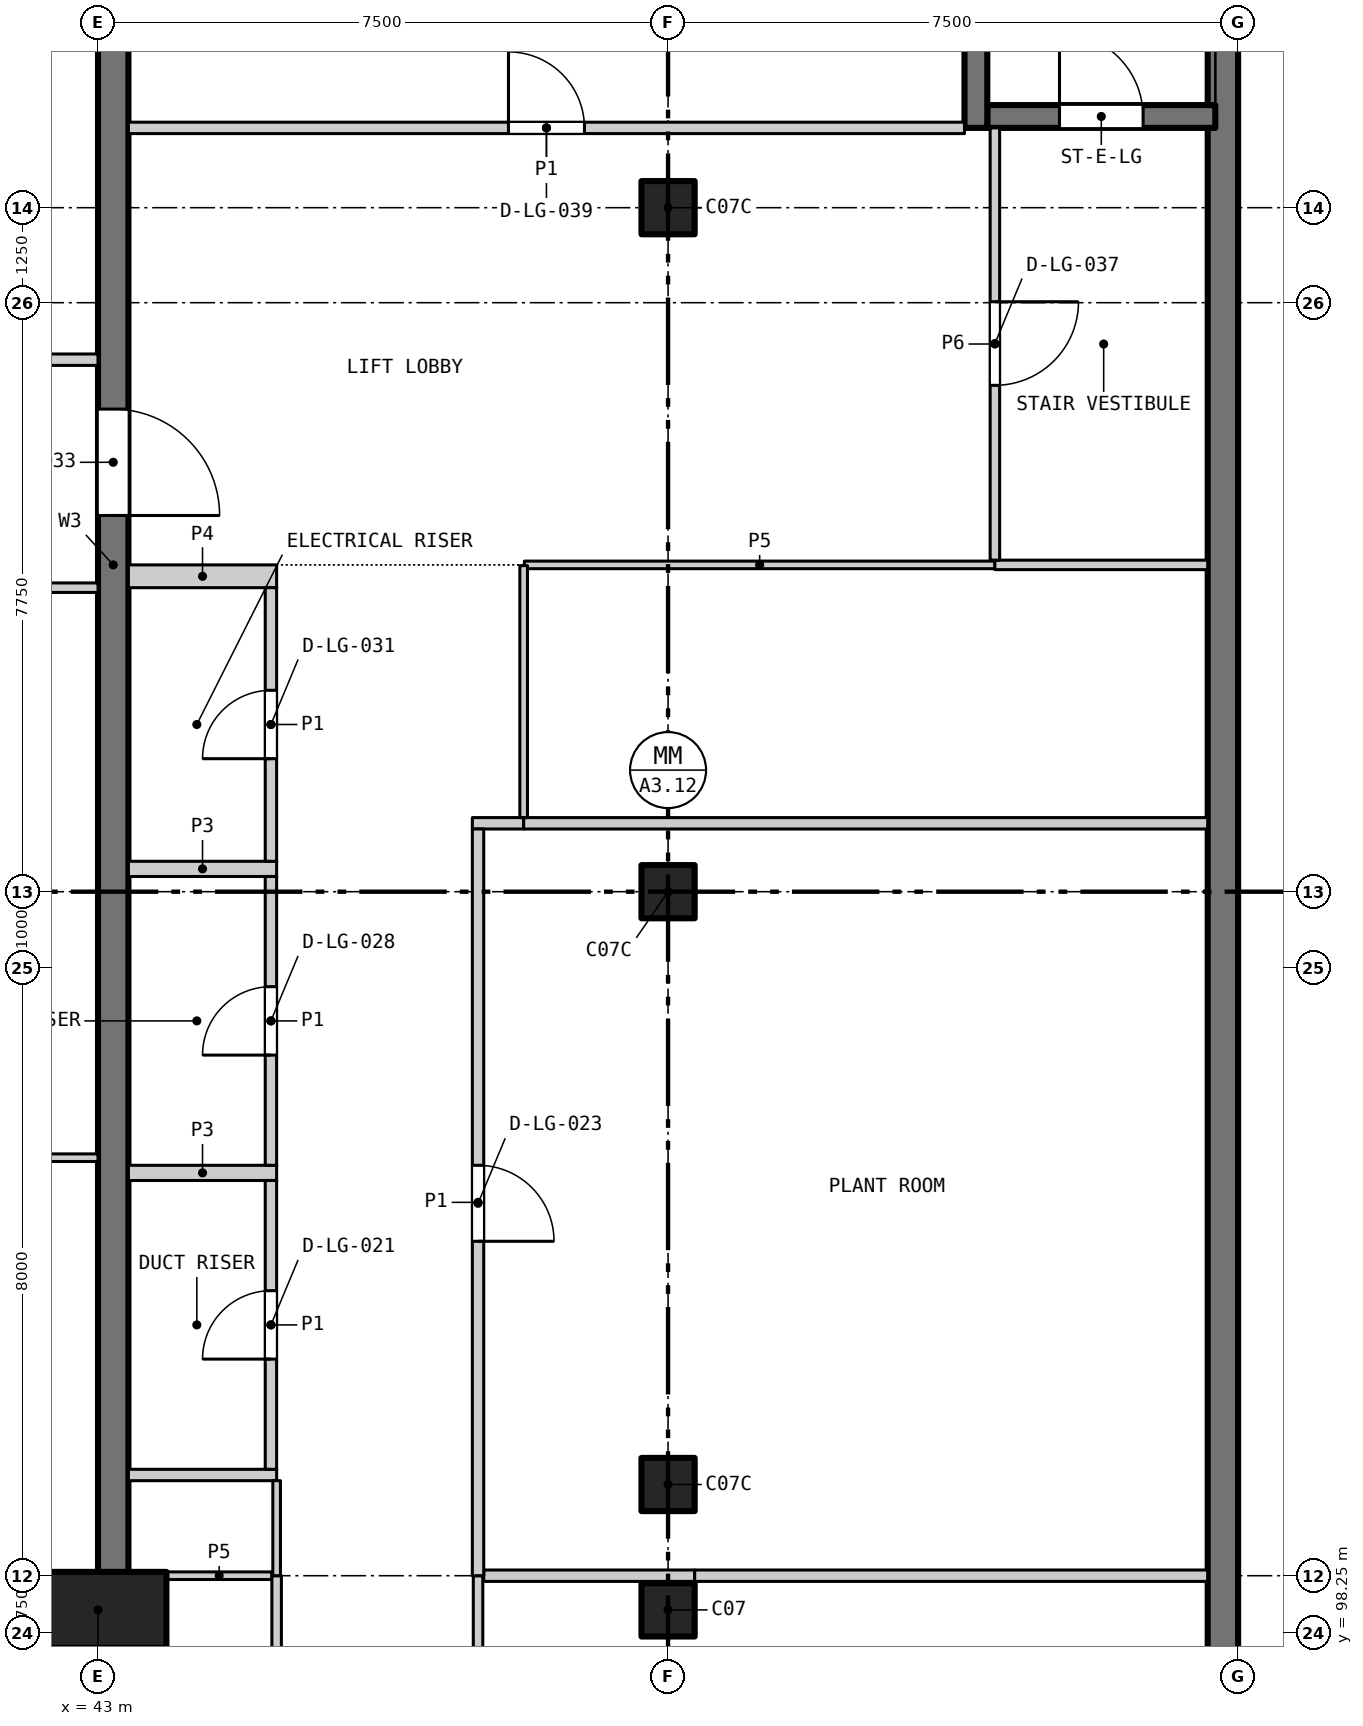
"""IFC4 building model, lengths in metres.
Left out: names, types, materials, properties, quantities, classifications, styles, units other than length and angle.
Written with IfcOpenShell. Run it as: python <this file> out.ifc"""

import sys

from ifc_helpers import new_model, si_unit, direction, frame, frame_2d, origin, origin_2d, place, context, subcontext, project, spatial, rectangle, extrude, element, fill, save


model = new_model("IFC4")
c1 = context("Model", 3, precision=1e-05, world=origin(), true_north=direction((0.0, 1.0)))
c2 = subcontext(c1, "Body", "Model", "MODEL_VIEW")
j1 = project(units=[si_unit("LENGTHUNIT", "METRE"), si_unit("PLANEANGLEUNIT", "RADIAN")], contexts=[c1])
p1 = place(None, origin())
s1 = spatial("IfcSite", under=j1, at=p1, CompositionType="ELEMENT")
p2 = place(p1, origin())
s2 = spatial("IfcBuilding", under=s1, at=p2, CompositionType="ELEMENT")
p3 = place(p2, frame((0.0, 0.0, -5.0)))
s3 = spatial("IfcBuildingStorey", under=s2, at=p3, CompositionType="ELEMENT", Elevation=-5.0)
for number, where, z_axis, x_axis in (
    (1, (50.5, 98.55, 0.0), (0.0, 0.0, 1.0), (1.0, 0.0, 0.0)),
    (2, (50.5, 100.2, 0.0), (0.0, 0.0, 1.0), (1.0, 0.0, 0.0)),
    (3, (50.5, 108.0, 0.0), (0.0, 0.0, 1.0), (1.0, 0.0, 0.0)),
    (4, (50.5, 117.0, 0.0), (0.0, 0.0, 1.0), (1.0, 0.0, 0.0)),
):
    element("IfcColumn", number, at=place(p3, frame(where, z_axis=z_axis, x_axis=x_axis)), inside=s3, PredefinedType="COLUMN", context=c2, shape_type="SweptSolid", body=[
        extrude(rectangle(XDim=0.7, YDim=0.7, at=origin_2d()), origin(), (0.0, 0.0, 1.0), 5.0),
    ])
p4 = place(p3, frame((57.8, 18.0, 0.0), z_axis=(0.0, 0.0, 1.0), x_axis=(0.0, 1.0, 0.0)))
e5 = element("IfcWall", 5, at=p4, inside=s3, PredefinedType="SOLIDWALL", context=c2, shape_type="SweptSolid", body=[
    extrude(rectangle(XDim=108.0, YDim=0.4, at=frame_2d((54.0, 0.0))), origin(), (0.0, 0.0, 1.0), 5.0),
])
p5 = place(p3, frame((43.2, 99.0, 0.0), z_axis=(0.0, 0.0, 1.0), x_axis=(0.0, 1.0, 0.0)))
e6 = element("IfcWall", 6, at=p5, inside=s3, PredefinedType="SHEAR", context=c2, shape_type="SweptSolid", body=[
    extrude(rectangle(XDim=26.6, YDim=0.4, at=frame_2d((13.3, 0.0))), origin(), (0.0, 0.0, 1.0), 5.0),
])
p6 = place(p5, frame((13.95, 0.0, 0.0)))
e7 = element("IfcOpeningElement", 7, at=p6, cuts=e6, PredefinedType="OPENING", context=c2, shape_type="SweptSolid", body=[
    extrude(rectangle(XDim=1.4, YDim=2.4, at=frame_2d((0.7, 1.2))), frame((0.0, 0.21, 0.0), z_axis=(0.0, -1.0, 0.0), x_axis=(1.0, 0.0, 0.0)), (0.0, 0.0, 1.0), 0.42),
])
p7 = place(p3, frame((54.7, 118.2, 0.0), z_axis=(0.0, 0.0, 1.0), x_axis=(1.0, 0.0, 0.0)))
e8 = element("IfcWall", 8, at=p7, inside=s3, PredefinedType="SHEAR", context=c2, shape_type="SweptSolid", body=[
    extrude(rectangle(XDim=3.0, YDim=0.3, at=frame_2d((1.5, 0.0))), origin(), (0.0, 0.0, 1.0), 5.0),
])
p8 = place(p7, frame((0.95, 0.0, 0.0)))
e9 = element("IfcOpeningElement", 9, at=p8, cuts=e8, PredefinedType="OPENING", context=c2, shape_type="SweptSolid", body=[
    extrude(rectangle(XDim=1.1, YDim=2.1, at=frame_2d((0.55, 1.05))), frame((0.0, 0.16, 0.0), z_axis=(0.0, -1.0, 0.0), x_axis=(1.0, 0.0, 0.0)), (0.0, 0.0, 1.0), 0.32),
])
p9 = place(p3, frame((54.55, 118.05, 0.0), z_axis=(0.0, 0.0, 1.0), x_axis=(0.0, 1.0, 0.0)))
e10 = element("IfcWall", 10, at=p9, inside=s3, PredefinedType="SHEAR", context=c2, shape_type="SweptSolid", body=[
    extrude(rectangle(XDim=7.5, YDim=0.3, at=frame_2d((3.75, 0.0))), origin(), (0.0, 0.0, 1.0), 5.0),
])
p10 = place(p3, frame((43.0, 98.55, 0.0), z_axis=(0.0, 0.0, 1.0), x_axis=(1.0, 0.0, 0.0)))
e11 = element("IfcColumn", 11, at=p10, inside=s3, PredefinedType="COLUMN", context=c2, shape_type="SweptSolid", body=[
    extrude(rectangle(XDim=1.8, YDim=1.0, at=origin_2d()), origin(), (0.0, 0.0, 1.0), 5.0),
])
p11 = place(p3, frame((43.4, 100.325, 0.0), z_axis=(0.0, 0.0, 1.0), x_axis=(1.0, 0.0, 0.0)))
e12 = element("IfcWall", 12, at=p11, inside=s3, PredefinedType="PARTITIONING", context=c2, shape_type="SweptSolid", body=[
    extrude(rectangle(XDim=1.95, YDim=0.15, at=frame_2d((0.975, 0.0))), origin(), (0.0, 0.0, 1.0), 4.7),
])
for number, where, z_axis, x_axis in (
    (13, (43.4, 104.3, 0.0), (0.0, 0.0, 1.0), (1.0, 0.0, 0.0)),
    (14, (43.4, 108.3, 0.0), (0.0, 0.0, 1.0), (1.0, 0.0, 0.0)),
):
    element("IfcWall", number, at=place(p3, frame(where, z_axis=z_axis, x_axis=x_axis)), inside=s3, PredefinedType="PARTITIONING", context=c2, shape_type="SweptSolid", body=[
        extrude(rectangle(XDim=1.95, YDim=0.2, at=frame_2d((0.975, 0.0))), origin(), (0.0, 0.0, 1.0), 4.7),
    ])
p12 = place(p3, frame((43.4, 112.15, 0.0), z_axis=(0.0, 0.0, 1.0), x_axis=(1.0, 0.0, 0.0)))
e15 = element("IfcWall", 15, at=p12, inside=s3, PredefinedType="PARTITIONING", context=c2, shape_type="SweptSolid", body=[
    extrude(rectangle(XDim=1.95, YDim=0.3, at=frame_2d((0.975, 0.0))), origin(), (0.0, 0.0, 1.0), 4.7),
])
p13 = place(p3, frame((45.275, 100.4, 0.0), z_axis=(0.0, 0.0, 1.0), x_axis=(0.0, 1.0, 0.0)))
e16 = element("IfcWall", 16, at=p13, inside=s3, PredefinedType="PARTITIONING", context=c2, shape_type="SweptSolid", body=[
    extrude(rectangle(XDim=3.8, YDim=0.15, at=frame_2d((1.9, 0.0))), origin(), (0.0, 0.0, 1.0), 4.7),
])
p14 = place(p13, frame((1.45, 0.0, 0.0)))
e17 = element("IfcOpeningElement", 17, at=p14, cuts=e16, PredefinedType="OPENING", context=c2, shape_type="SweptSolid", body=[
    extrude(rectangle(XDim=0.9, YDim=2.1, at=frame_2d((0.45, 1.05))), frame((0.0, 0.085, 0.0), z_axis=(0.0, -1.0, 0.0), x_axis=(1.0, 0.0, 0.0)), (0.0, 0.0, 1.0), 0.17),
])
p15 = place(p3, frame((45.275, 104.4, 0.0), z_axis=(0.0, 0.0, 1.0), x_axis=(0.0, 1.0, 0.0)))
e18 = element("IfcWall", 18, at=p15, inside=s3, PredefinedType="PARTITIONING", context=c2, shape_type="SweptSolid", body=[
    extrude(rectangle(XDim=3.8, YDim=0.15, at=frame_2d((1.9, 0.0))), origin(), (0.0, 0.0, 1.0), 4.7),
])
p16 = place(p15, frame((1.45, 0.0, 0.0)))
e19 = element("IfcOpeningElement", 19, at=p16, cuts=e18, PredefinedType="OPENING", context=c2, shape_type="SweptSolid", body=[
    extrude(rectangle(XDim=0.9, YDim=2.1, at=frame_2d((0.45, 1.05))), frame((0.0, 0.085, 0.0), z_axis=(0.0, -1.0, 0.0), x_axis=(1.0, 0.0, 0.0)), (0.0, 0.0, 1.0), 0.17),
])
p17 = place(p3, frame((45.275, 108.4, 0.0), z_axis=(0.0, 0.0, 1.0), x_axis=(0.0, 1.0, 0.0)))
e20 = element("IfcWall", 20, at=p17, inside=s3, PredefinedType="PARTITIONING", context=c2, shape_type="SweptSolid", body=[
    extrude(rectangle(XDim=3.6, YDim=0.15, at=frame_2d((1.8, 0.0))), origin(), (0.0, 0.0, 1.0), 4.7),
])
p18 = place(p17, frame((1.35, 0.0, 0.0)))
e21 = element("IfcOpeningElement", 21, at=p18, cuts=e20, PredefinedType="OPENING", context=c2, shape_type="SweptSolid", body=[
    extrude(rectangle(XDim=0.9, YDim=2.1, at=frame_2d((0.45, 1.05))), frame((0.0, 0.085, 0.0), z_axis=(0.0, -1.0, 0.0), x_axis=(1.0, 0.0, 0.0)), (0.0, 0.0, 1.0), 0.17),
])
p19 = place(p3, frame((43.9, 99.0, 0.0), z_axis=(0.0, 0.0, 1.0), x_axis=(1.0, 0.0, 0.0)))
e22 = element("IfcWall", 22, at=p19, inside=s3, PredefinedType="PARTITIONING", context=c2, shape_type="SweptSolid", body=[
    extrude(rectangle(XDim=1.388, YDim=0.1, at=frame_2d((0.694, 0.0))), origin(), (0.0, 0.0, 1.0), 4.65),
])
p20 = place(p3, frame((48.075, 99.0, 0.0), z_axis=(0.0, 0.0, 1.0), x_axis=(1.0, 0.0, 0.0)))
e23 = element("IfcWall", 23, at=p20, inside=s3, PredefinedType="PARTITIONING", context=c2, shape_type="SweptSolid", body=[
    extrude(rectangle(XDim=2.775, YDim=0.15, at=frame_2d((1.388, 0.0))), origin(), (0.0, 0.0, 1.0), 4.7),
])
p21 = place(p3, frame((36.55, 104.5, 0.0), z_axis=(0.0, 0.0, 1.0), x_axis=(1.0, 0.0, 0.0)))
e24 = element("IfcWall", 24, at=p21, inside=s3, PredefinedType="PARTITIONING", context=c2, shape_type="SweptSolid", body=[
    extrude(rectangle(XDim=6.45, YDim=0.1, at=frame_2d((3.225, 0.0))), origin(), (0.0, 0.0, 1.0), 4.7),
])
p22 = place(p3, frame((47.925, 108.9, 0.0), z_axis=(0.0, 0.0, 1.0), x_axis=(1.0, 0.0, 0.0)))
e25 = element("IfcWall", 25, at=p22, inside=s3, PredefinedType="PARTITIONING", context=c2, shape_type="SweptSolid", body=[
    extrude(rectangle(XDim=0.675, YDim=0.15, at=frame_2d((0.337, 0.0))), origin(), (0.0, 0.0, 1.0), 4.7),
])
p23 = place(p3, frame((48.6, 108.9, 0.0), z_axis=(0.0, 0.0, 1.0), x_axis=(1.0, 0.0, 0.0)))
e26 = element("IfcWall", 26, at=p23, inside=s3, PredefinedType="PARTITIONING", context=c2, shape_type="SweptSolid", body=[
    extrude(rectangle(XDim=9.0, YDim=0.15, at=frame_2d((4.5, 0.0))), origin(), (0.0, 0.0, 1.0), 4.7),
])
p24 = place(p3, frame((40.0, 112.0, 0.0), z_axis=(0.0, 0.0, 1.0), x_axis=(1.0, 0.0, 0.0)))
e27 = element("IfcWall", 27, at=p24, inside=s3, PredefinedType="PARTITIONING", context=c2, shape_type="SweptSolid", body=[
    extrude(rectangle(XDim=3.0, YDim=0.125, at=frame_2d((1.5, 0.0))), origin(), (0.0, 0.0, 1.0), 4.7),
])
p25 = place(p3, frame((48.61, 112.3, 0.0), z_axis=(0.0, 0.0, 1.0), x_axis=(1.0, 0.0, 0.0)))
e28 = element("IfcWall", 28, at=p25, inside=s3, PredefinedType="PARTITIONING", context=c2, shape_type="SweptSolid", body=[
    extrude(rectangle(XDim=6.19, YDim=0.1, at=frame_2d((3.095, 0.0))), origin(), (0.0, 0.0, 1.0), 4.7),
])
p26 = place(p3, frame((54.8, 112.3, 0.0), z_axis=(0.0, 0.0, 1.0), x_axis=(1.0, 0.0, 0.0)))
e29 = element("IfcWall", 29, at=p26, inside=s3, PredefinedType="PARTITIONING", context=c2, shape_type="SweptSolid", body=[
    extrude(rectangle(XDim=2.8, YDim=0.125, at=frame_2d((1.4, 0.0))), origin(), (0.0, 0.0, 1.0), 4.7),
])
p27 = place(p3, frame((29.0, 115.0, 0.0), z_axis=(0.0, 0.0, 1.0), x_axis=(1.0, 0.0, 0.0)))
e30 = element("IfcWall", 30, at=p27, inside=s3, PredefinedType="PARTITIONING", context=c2, shape_type="SweptSolid", body=[
    extrude(rectangle(XDim=14.0, YDim=0.15, at=frame_2d((7.0, 0.0))), origin(), (0.0, 0.0, 1.0), 4.7),
])
p28 = place(p27, frame((6.0, 0.0, 0.0)))
e31 = element("IfcOpeningElement", 31, at=p28, cuts=e30, PredefinedType="OPENING", context=c2, shape_type="SweptSolid", body=[
    extrude(rectangle(XDim=2.0, YDim=2.4, at=frame_2d((1.0, 1.2))), frame((0.0, 0.085, 0.0), z_axis=(0.0, -1.0, 0.0), x_axis=(1.0, 0.0, 0.0)), (0.0, 0.0, 1.0), 0.17),
])
p29 = place(p3, frame((43.4, 118.05, 0.0), z_axis=(0.0, 0.0, 1.0), x_axis=(1.0, 0.0, 0.0)))
e32 = element("IfcWall", 32, at=p29, inside=s3, PredefinedType="PARTITIONING", context=c2, shape_type="SweptSolid", body=[
    extrude(rectangle(XDim=11.0, YDim=0.15, at=frame_2d((5.5, 0.0))), origin(), (0.0, 0.0, 1.0), 4.7),
])
p30 = place(p29, frame((5.0, 0.0, 0.0)))
e33 = element("IfcOpeningElement", 33, at=p30, cuts=e32, PredefinedType="OPENING", context=c2, shape_type="SweptSolid", body=[
    extrude(rectangle(XDim=1.0, YDim=2.1, at=frame_2d((0.5, 1.05))), frame((0.0, 0.085, 0.0), z_axis=(0.0, -1.0, 0.0), x_axis=(1.0, 0.0, 0.0)), (0.0, 0.0, 1.0), 0.17),
])
p31 = place(p3, frame((45.35, 84.0, 0.0), z_axis=(0.0, 0.0, 1.0), x_axis=(0.0, 1.0, 0.0)))
e34 = element("IfcWall", 34, at=p31, inside=s3, PredefinedType="PARTITIONING", context=c2, shape_type="SweptSolid", body=[
    extrude(rectangle(XDim=15.0, YDim=0.125, at=frame_2d((7.5, 0.0))), origin(), (0.0, 0.0, 1.0), 4.65),
])
p32 = place(p31, frame((7.0, 0.0, 0.0)))
e35 = element("IfcOpeningElement", 35, at=p32, cuts=e34, PredefinedType="OPENING", context=c2, shape_type="SweptSolid", body=[
    extrude(rectangle(XDim=1.0, YDim=2.1, at=frame_2d((0.5, 1.05))), frame((0.0, 0.073, 0.0), z_axis=(0.0, -1.0, 0.0), x_axis=(1.0, 0.0, 0.0)), (0.0, 0.0, 1.0), 0.145),
])
p33 = place(p3, frame((45.35, 99.0, 0.0), z_axis=(0.0, 0.0, 1.0), x_axis=(0.0, 1.0, 0.0)))
e36 = element("IfcWall", 36, at=p33, inside=s3, PredefinedType="PARTITIONING", context=c2, shape_type="SweptSolid", body=[
    extrude(rectangle(XDim=1.25, YDim=0.1, at=frame_2d((0.625, 0.0))), origin(), (0.0, 0.0, 1.0), 4.7),
])
p34 = place(p3, frame((48.0, 81.0, 0.0), z_axis=(0.0, 0.0, 1.0), x_axis=(0.0, 1.0, 0.0)))
e37 = element("IfcWall", 37, at=p34, inside=s3, PredefinedType="PARTITIONING", context=c2, shape_type="SweptSolid", body=[
    extrude(rectangle(XDim=18.0, YDim=0.125, at=frame_2d((9.0, 0.0))), origin(), (0.0, 0.0, 1.0), 4.7),
])
p35 = place(p34, frame((8.5, 0.0, 0.0)))
e38 = element("IfcOpeningElement", 38, at=p35, cuts=e37, PredefinedType="OPENING", context=c2, shape_type="SweptSolid", body=[
    extrude(rectangle(XDim=1.0, YDim=2.1, at=frame_2d((0.5, 1.05))), frame((0.0, 0.073, 0.0), z_axis=(0.0, -1.0, 0.0), x_axis=(1.0, 0.0, 0.0)), (0.0, 0.0, 1.0), 0.145),
])
p36 = place(p3, frame((48.0, 99.0, 0.0), z_axis=(0.0, 0.0, 1.0), x_axis=(0.0, 1.0, 0.0)))
e39 = element("IfcWall", 39, at=p36, inside=s3, PredefinedType="PARTITIONING", context=c2, shape_type="SweptSolid", body=[
    extrude(rectangle(XDim=9.825, YDim=0.15, at=frame_2d((4.913, 0.0))), origin(), (0.0, 0.0, 1.0), 4.7),
])
p37 = place(p36, frame((4.4, 0.0, 0.0)))
e40 = element("IfcOpeningElement", 40, at=p37, cuts=e39, PredefinedType="OPENING", context=c2, shape_type="SweptSolid", body=[
    extrude(rectangle(XDim=1.0, YDim=2.1, at=frame_2d((0.5, 1.05))), frame((0.0, 0.085, 0.0), z_axis=(0.0, -1.0, 0.0), x_axis=(1.0, 0.0, 0.0)), (0.0, 0.0, 1.0), 0.17),
])
p38 = place(p3, frame((48.6, 108.975, 0.0), z_axis=(0.0, 0.0, 1.0), x_axis=(0.0, 1.0, 0.0)))
e41 = element("IfcWall", 41, at=p38, inside=s3, PredefinedType="PARTITIONING", context=c2, shape_type="SweptSolid", body=[
    extrude(rectangle(XDim=3.315, YDim=0.1, at=frame_2d((1.657, 0.0))), origin(), (0.0, 0.0, 1.0), 4.7),
])
p39 = place(p3, frame((54.8, 112.363, 0.0), z_axis=(0.0, 0.0, 1.0), x_axis=(0.0, 1.0, 0.0)))
e42 = element("IfcWall", 42, at=p39, inside=s3, PredefinedType="PARTITIONING", context=c2, shape_type="SweptSolid", body=[
    extrude(rectangle(XDim=5.688, YDim=0.125, at=frame_2d((2.844, 0.0))), origin(), (0.0, 0.0, 1.0), 4.7),
])
p40 = place(p39, frame((2.3, 0.0, 0.0)))
e43 = element("IfcOpeningElement", 43, at=p40, cuts=e42, PredefinedType="OPENING", context=c2, shape_type="SweptSolid", body=[
    extrude(rectangle(XDim=1.1, YDim=2.1, at=frame_2d((0.55, 1.05))), frame((0.0, 0.073, 0.0), z_axis=(0.0, -1.0, 0.0), x_axis=(1.0, 0.0, 0.0)), (0.0, 0.0, 1.0), 0.145),
])
p41 = place(p3, frame((50.85, 99.0, 0.0), z_axis=(0.0, 0.0, 1.0), x_axis=(1.0, 0.0, 0.0)))
e44 = element("IfcWall", 44, at=p41, inside=s3, PredefinedType="PARTITIONING", context=c2, shape_type="SweptSolid", body=[
    extrude(rectangle(XDim=6.75, YDim=0.15, at=frame_2d((3.375, 0.0))), origin(), (0.0, 0.0, 1.0), 4.1),
])
p42 = place(p14, origin())
e45 = element("IfcDoor", 45, at=p42, inside=s3, OperationType="SINGLE_SWING_LEFT", PredefinedType="DOOR", context=c2, shape_type="SweptSolid", body=[
    extrude(rectangle(XDim=0.9, YDim=2.1, at=frame_2d((0.45, 1.05))), frame((0.0, 0.025, 0.0), z_axis=(0.0, -1.0, 0.0), x_axis=(1.0, 0.0, 0.0)), (0.0, 0.0, 1.0), 0.05),
])
fill(e17, e45)
p43 = place(p37, frame((1.0, 0.0, 0.0), z_axis=(0.0, 0.0, 1.0), x_axis=(-1.0, 0.0, 0.0)))
e46 = element("IfcDoor", 46, at=p43, inside=s3, OperationType="SINGLE_SWING_RIGHT", PredefinedType="DOOR", context=c2, shape_type="SweptSolid", body=[
    extrude(rectangle(XDim=1.0, YDim=2.1, at=frame_2d((0.5, 1.05))), frame((0.0, 0.025, 0.0), z_axis=(0.0, -1.0, 0.0), x_axis=(1.0, 0.0, 0.0)), (0.0, 0.0, 1.0), 0.05),
])
fill(e40, e46)
p44 = place(p16, origin())
e47 = element("IfcDoor", 47, at=p44, inside=s3, OperationType="SINGLE_SWING_LEFT", PredefinedType="DOOR", context=c2, shape_type="SweptSolid", body=[
    extrude(rectangle(XDim=0.9, YDim=2.1, at=frame_2d((0.45, 1.05))), frame((0.0, 0.025, 0.0), z_axis=(0.0, -1.0, 0.0), x_axis=(1.0, 0.0, 0.0)), (0.0, 0.0, 1.0), 0.05),
])
fill(e19, e47)
p45 = place(p18, origin())
e48 = element("IfcDoor", 48, at=p45, inside=s3, OperationType="SINGLE_SWING_LEFT", PredefinedType="DOOR", context=c2, shape_type="SweptSolid", body=[
    extrude(rectangle(XDim=0.9, YDim=2.1, at=frame_2d((0.45, 1.05))), frame((0.0, 0.025, 0.0), z_axis=(0.0, -1.0, 0.0), x_axis=(1.0, 0.0, 0.0)), (0.0, 0.0, 1.0), 0.05),
])
fill(e21, e48)
p46 = place(p6, frame((1.4, 0.0, 0.0), z_axis=(0.0, 0.0, 1.0), x_axis=(-1.0, 0.0, 0.0)))
e49 = element("IfcDoor", 49, at=p46, inside=s3, OperationType="SINGLE_SWING_RIGHT", PredefinedType="DOOR", context=c2, shape_type="SweptSolid", body=[
    extrude(rectangle(XDim=1.4, YDim=2.4, at=frame_2d((0.7, 1.2))), frame((0.0, 0.025, 0.0), z_axis=(0.0, -1.0, 0.0), x_axis=(1.0, 0.0, 0.0)), (0.0, 0.0, 1.0), 0.05),
])
fill(e7, e49)
p47 = place(p40, frame((1.1, 0.0, 0.0), z_axis=(0.0, 0.0, 1.0), x_axis=(-1.0, 0.0, 0.0)))
e50 = element("IfcDoor", 50, at=p47, inside=s3, OperationType="SINGLE_SWING_LEFT", PredefinedType="DOOR", context=c2, shape_type="SweptSolid", body=[
    extrude(rectangle(XDim=1.1, YDim=2.1, at=frame_2d((0.55, 1.05))), frame((0.0, 0.025, 0.0), z_axis=(0.0, -1.0, 0.0), x_axis=(1.0, 0.0, 0.0)), (0.0, 0.0, 1.0), 0.05),
])
fill(e43, e50)
p48 = place(p30, origin())
e51 = element("IfcDoor", 51, at=p48, inside=s3, OperationType="SINGLE_SWING_LEFT", PredefinedType="DOOR", context=c2, shape_type="SweptSolid", body=[
    extrude(rectangle(XDim=1.0, YDim=2.1, at=frame_2d((0.5, 1.05))), frame((0.0, 0.025, 0.0), z_axis=(0.0, -1.0, 0.0), x_axis=(1.0, 0.0, 0.0)), (0.0, 0.0, 1.0), 0.05),
])
fill(e33, e51)
p49 = place(p8, origin())
e52 = element("IfcDoor", 52, at=p49, inside=s3, OperationType="SINGLE_SWING_LEFT", PredefinedType="DOOR", context=c2, shape_type="SweptSolid", body=[
    extrude(rectangle(XDim=1.1, YDim=2.1, at=frame_2d((0.55, 1.05))), frame((0.0, 0.025, 0.0), z_axis=(0.0, -1.0, 0.0), x_axis=(1.0, 0.0, 0.0)), (0.0, 0.0, 1.0), 0.05),
])
fill(e9, e52)
save(model, sys.argv[1])
